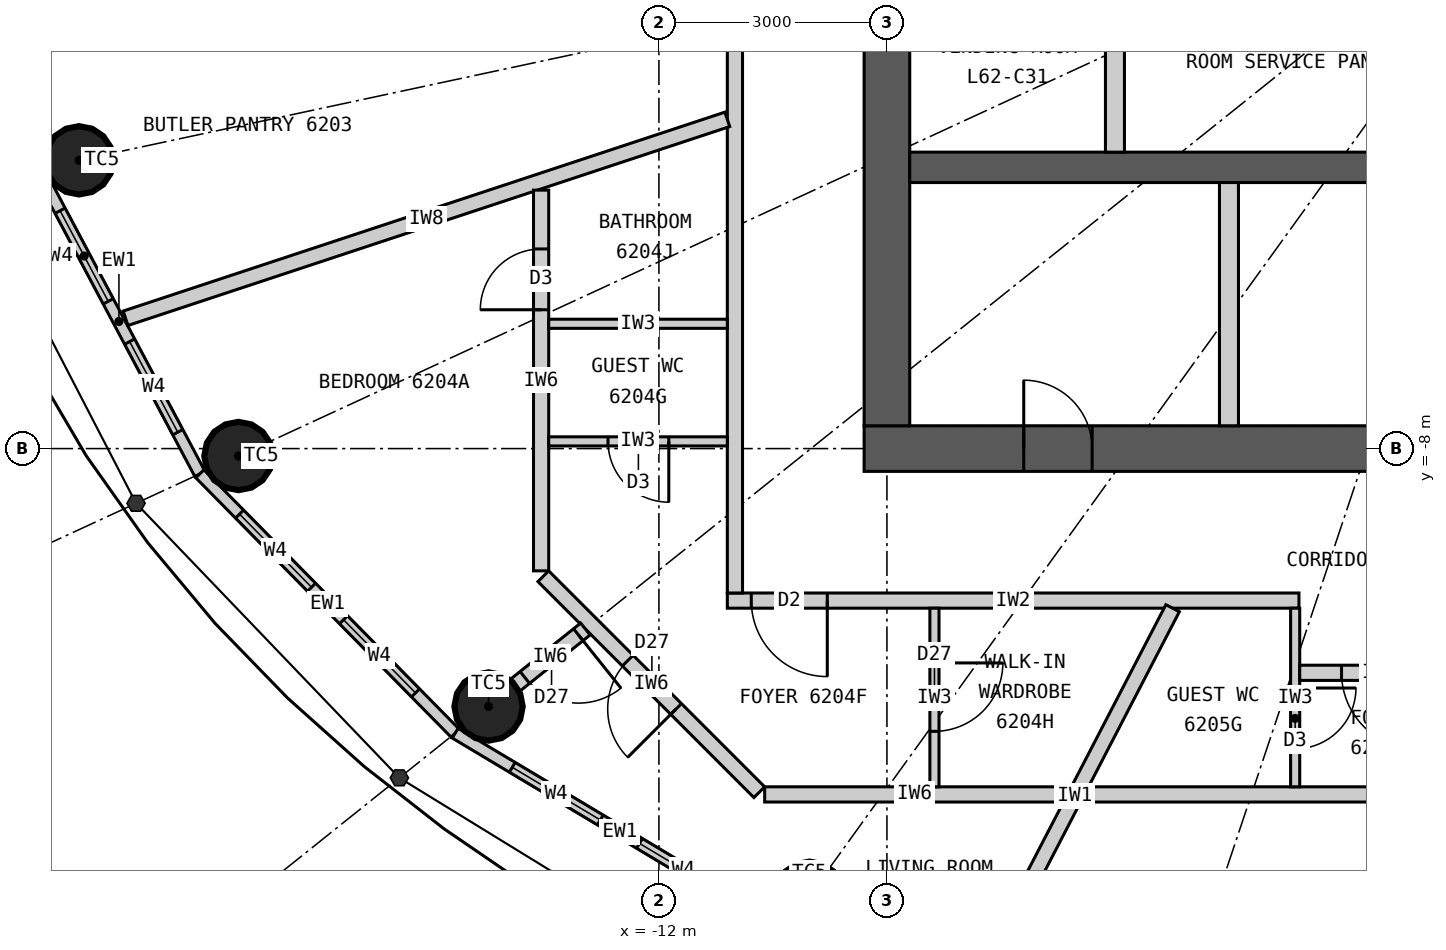
"""IFC4 building model, lengths in metres.
Left out: names, types, materials, properties, quantities, classifications, styles, units other than length and angle.
Written with IfcOpenShell. Run it as: python <this file> out.ifc"""

import sys

from ifc_helpers import new_model, si_unit, direction, frame, frame_2d, origin, origin_2d, place, context, subcontext, project, spatial, rectangle, circle, extrude, clip, halfspace, element, fill, save


model = new_model("IFC4")
c1 = context("Model", 3, precision=1e-05, world=origin(), true_north=direction((0.0, 1.0)))
c2 = subcontext(c1, "Body", "Model", "MODEL_VIEW")
j1 = project(units=[si_unit("LENGTHUNIT", "METRE"), si_unit("PLANEANGLEUNIT", "RADIAN")], contexts=[c1])
p1 = place(None, origin())
s1 = spatial("IfcSite", under=j1, at=p1, CompositionType="ELEMENT")
p2 = place(p1, origin())
s2 = spatial("IfcBuilding", under=s1, at=p2, CompositionType="ELEMENT")
p3 = place(p2, frame((0.0, 0.0, 229.2)))
s3 = spatial("IfcBuildingStorey", under=s2, at=p3, CompositionType="ELEMENT", Elevation=229.2)
for number, where, z_axis, x_axis in (
    (1, (-19.629, -4.208, 0.0), (0.0, 0.0, 1.0), (1.0, 0.0, 0.0)),
    (2, (-17.532, -8.098, 0.0), (0.0, 0.0, 1.0), (1.0, 0.0, 0.0)),
    (3, (-14.241, -11.393, 0.0), (0.0, 0.0, 1.0), (1.0, 0.0, 0.0)),
    (4, (-10.019, -13.883, 0.0), (0.0, 0.0, 1.0), (1.0, 0.0, 0.0)),
):
    element("IfcColumn", number, at=place(p3, frame(where, z_axis=z_axis, x_axis=x_axis)), inside=s3, PredefinedType="COLUMN", context=c2, shape_type="Clipping", body=[
        clip(extrude(circle(Radius=0.45, at=origin_2d()), origin(), (0.0, 0.0, 1.0), 3.3), halfspace(frame((0.0, 0.0, 2.25), z_axis=(0.0, 0.0, 1.0), x_axis=(1.0, 0.0, 0.0)), False)),
    ])
p4 = place(p3, frame((9.3, -8.0, 0.0), z_axis=(0.0, 0.0, 1.0), x_axis=(-1.0, 0.0, 0.0)))
e5 = element("IfcWall", 5, at=p4, inside=s3, PredefinedType="SHEAR", context=c2, shape_type="SweptSolid", body=[
    extrude(rectangle(XDim=18.6, YDim=0.6, at=frame_2d((9.3, 0.0))), origin(), (0.0, 0.0, 1.0), 3.3),
])
p5 = place(p4, frame((8.0, 0.0, 0.0)))
e6 = element("IfcOpeningElement", 6, at=p5, cuts=e5, PredefinedType="OPENING", context=c2, shape_type="SweptSolid", body=[
    extrude(rectangle(XDim=1.2, YDim=2.2, at=frame_2d((0.6, 1.1))), frame((0.0, 0.31, 0.0), z_axis=(0.0, -1.0, 0.0), x_axis=(1.0, 0.0, 0.0)), (0.0, 0.0, 1.0), 0.62),
])
p6 = place(p4, frame((15.6, 0.0, 0.0)))
e7 = element("IfcOpeningElement", 7, at=p6, cuts=e5, PredefinedType="OPENING", context=c2, shape_type="SweptSolid", body=[
    extrude(rectangle(XDim=0.9, YDim=2.2, at=frame_2d((0.45, 1.1))), frame((0.0, 0.31, 0.0), z_axis=(0.0, -1.0, 0.0), x_axis=(1.0, 0.0, 0.0)), (0.0, 0.0, 1.0), 0.62),
])
p7 = place(p3, frame((-9.0, 7.7, 0.0), z_axis=(0.0, 0.0, 1.0), x_axis=(0.0, -1.0, 0.0)))
e8 = element("IfcWall", 8, at=p7, inside=s3, PredefinedType="SHEAR", context=c2, shape_type="SweptSolid", body=[
    extrude(rectangle(XDim=15.4, YDim=0.6, at=frame_2d((7.7, 0.0))), origin(), (0.0, 0.0, 1.0), 3.3),
])
p8 = place(p7, frame((6.8, 0.0, 0.0)))
e9 = element("IfcOpeningElement", 9, at=p8, cuts=e8, PredefinedType="OPENING", context=c2, shape_type="SweptSolid", body=[
    extrude(rectangle(XDim=1.8, YDim=2.2, at=frame_2d((0.9, 1.1))), frame((0.0, 0.31, 0.0), z_axis=(0.0, -1.0, 0.0), x_axis=(1.0, 0.0, 0.0)), (0.0, 0.0, 1.0), 0.62),
])
p9 = place(p3, frame((-8.7, -4.3, 0.0), z_axis=(0.0, 0.0, 1.0), x_axis=(1.0, 0.0, 0.0)))
e10 = element("IfcWall", 10, at=p9, inside=s3, PredefinedType="SHEAR", context=c2, shape_type="SweptSolid", body=[
    extrude(rectangle(XDim=17.4, YDim=0.4, at=frame_2d((8.7, 0.0))), origin(), (0.0, 0.0, 1.0), 3.3),
])
p10 = place(p3, frame((-4.5, -7.7, 0.0), z_axis=(0.0, 0.0, 1.0), x_axis=(0.0, 1.0, 0.0)))
e11 = element("IfcWall", 11, at=p10, inside=s3, PredefinedType="PARTITIONING", context=c2, shape_type="SweptSolid", body=[
    extrude(rectangle(XDim=3.2, YDim=0.25, at=frame_2d((1.6, 0.0))), origin(), (0.0, 0.0, 1.0), 3.3),
])
p11 = place(p3, frame((-6.0, -4.1, 0.0), z_axis=(0.0, 0.0, 1.0), x_axis=(0.0, 1.0, 0.0)))
e12 = element("IfcWall", 12, at=p11, inside=s3, PredefinedType="PARTITIONING", context=c2, shape_type="SweptSolid", body=[
    extrude(rectangle(XDim=2.35, YDim=0.25, at=frame_2d((1.175, 0.0))), origin(), (0.0, 0.0, 1.0), 3.3),
])
p12 = place(p3, frame((-20.17, -4.323, 0.0), z_axis=(0.0, 0.0, 1.0), x_axis=(0.469256152955, -0.883062094597, 0.0)))
e13 = element("IfcWall", 13, at=p12, inside=s3, PredefinedType="ELEMENTEDWALL", context=c2, shape_type="SweptSolid", body=[
    extrude(rectangle(XDim=4.539, YDim=0.15, at=frame_2d((2.27, 0.0))), origin(), (0.0, 0.0, 1.0), 3.05),
])
p13 = place(p12, frame((0.62, 0.0, 0.9)))
e14 = element("IfcOpeningElement", 14, at=p13, cuts=e13, PredefinedType="OPENING", context=c2, shape_type="SweptSolid", body=[
    extrude(rectangle(XDim=1.35, YDim=1.9, at=frame_2d((0.675, 0.95))), frame((0.0, 0.085, 0.0), z_axis=(0.0, -1.0, 0.0), x_axis=(1.0, 0.0, 0.0)), (0.0, 0.0, 1.0), 0.17),
])
p14 = place(p12, frame((2.57, 0.0, 0.9)))
e15 = element("IfcOpeningElement", 15, at=p14, cuts=e13, PredefinedType="OPENING", context=c2, shape_type="SweptSolid", body=[
    extrude(rectangle(XDim=1.35, YDim=1.9, at=frame_2d((0.675, 0.95))), frame((0.0, 0.085, 0.0), z_axis=(0.0, -1.0, 0.0), x_axis=(1.0, 0.0, 0.0)), (0.0, 0.0, 1.0), 0.17),
])
p15 = place(p3, frame((-18.04, -8.332, 0.0), z_axis=(0.0, 0.0, 1.0), x_axis=(0.701527379618, -0.712642501993, 0.0)))
e16 = element("IfcWall", 16, at=p15, inside=s3, PredefinedType="ELEMENTEDWALL", context=c2, shape_type="SweptSolid", body=[
    extrude(rectangle(XDim=4.788, YDim=0.15, at=frame_2d((2.394, 0.0))), origin(), (0.0, 0.0, 1.0), 3.05),
])
p16 = place(p15, frame((0.744, 0.0, 0.9)))
e17 = element("IfcOpeningElement", 17, at=p16, cuts=e16, PredefinedType="OPENING", context=c2, shape_type="SweptSolid", body=[
    extrude(rectangle(XDim=1.35, YDim=1.9, at=frame_2d((0.675, 0.95))), frame((0.0, 0.085, 0.0), z_axis=(0.0, -1.0, 0.0), x_axis=(1.0, 0.0, 0.0)), (0.0, 0.0, 1.0), 0.17),
])
p17 = place(p15, frame((2.694, 0.0, 0.9)))
e18 = element("IfcOpeningElement", 18, at=p17, cuts=e16, PredefinedType="OPENING", context=c2, shape_type="SweptSolid", body=[
    extrude(rectangle(XDim=1.35, YDim=1.9, at=frame_2d((0.675, 0.95))), frame((0.0, 0.085, 0.0), z_axis=(0.0, -1.0, 0.0), x_axis=(1.0, 0.0, 0.0)), (0.0, 0.0, 1.0), 0.17),
])
p18 = place(p3, frame((-14.68, -11.744, 0.0), z_axis=(0.0, 0.0, 1.0), x_axis=(0.85822150553, -0.513279502265, 0.0)))
e19 = element("IfcWall", 19, at=p18, inside=s3, PredefinedType="ELEMENTEDWALL", context=c2, shape_type="SweptSolid", body=[
    extrude(rectangle(XDim=5.05, YDim=0.15, at=frame_2d((2.525, 0.0))), origin(), (0.0, 0.0, 1.0), 3.05),
])
p19 = place(p18, frame((0.875, 0.0, 0.9)))
e20 = element("IfcOpeningElement", 20, at=p19, cuts=e19, PredefinedType="OPENING", context=c2, shape_type="SweptSolid", body=[
    extrude(rectangle(XDim=1.35, YDim=1.9, at=frame_2d((0.675, 0.95))), frame((0.0, 0.085, 0.0), z_axis=(0.0, -1.0, 0.0), x_axis=(1.0, 0.0, 0.0)), (0.0, 0.0, 1.0), 0.17),
])
p20 = place(p18, frame((2.825, 0.0, 0.9)))
e21 = element("IfcOpeningElement", 21, at=p20, cuts=e19, PredefinedType="OPENING", context=c2, shape_type="SweptSolid", body=[
    extrude(rectangle(XDim=1.35, YDim=1.9, at=frame_2d((0.675, 0.95))), frame((0.0, 0.085, 0.0), z_axis=(0.0, -1.0, 0.0), x_axis=(1.0, 0.0, 0.0)), (0.0, 0.0, 1.0), 0.17),
])
p21 = place(p3, frame((-3.579, -10.0, 0.0), z_axis=(0.0, 0.0, 1.0), x_axis=(-1.0, 0.0, 0.0)))
e22 = element("IfcWall", 22, at=p21, inside=s3, PredefinedType="PARTITIONING", context=c2, shape_type="SweptSolid", body=[
    extrude(rectangle(XDim=7.521, YDim=0.2, at=frame_2d((3.761, 0.0))), origin(), (0.0, 0.0, 1.0), 3.05),
])
p22 = place(p21, frame((6.206, 0.0, 0.0)))
e23 = element("IfcOpeningElement", 23, at=p22, cuts=e22, PredefinedType="OPENING", context=c2, shape_type="SweptSolid", body=[
    extrude(rectangle(XDim=1.0, YDim=2.2, at=frame_2d((0.5, 1.1))), frame((0.0, 0.11, 0.0), z_axis=(0.0, -1.0, 0.0), x_axis=(1.0, 0.0, 0.0)), (0.0, 0.0, 1.0), 0.22),
])
p23 = place(p3, frame((-11.0, 9.9, 0.0), z_axis=(0.0, 0.0, 1.0), x_axis=(0.0, -1.0, 0.0)))
e24 = element("IfcWall", 24, at=p23, inside=s3, PredefinedType="PARTITIONING", context=c2, shape_type="SweptSolid", body=[
    extrude(rectangle(XDim=19.8, YDim=0.2, at=frame_2d((9.9, 0.0))), origin(), (0.0, 0.0, 1.0), 3.05),
])
p24 = place(p23, frame((11.444, 0.0, 0.0)))
e25 = element("IfcOpeningElement", 25, at=p24, cuts=e24, PredefinedType="OPENING", context=c2, shape_type="SweptSolid", body=[
    extrude(rectangle(XDim=1.0, YDim=2.2, at=frame_2d((0.5, 1.1))), frame((0.0, 0.11, 0.0), z_axis=(0.0, -1.0, 0.0), x_axis=(1.0, 0.0, 0.0)), (0.0, 0.0, 1.0), 0.22),
])
p25 = place(p3, frame((-11.1, -3.669, 0.0), z_axis=(0.0, 0.0, 1.0), x_axis=(-0.949476668397, -0.313837627079, 0.0)))
e26 = element("IfcWall", 26, at=p25, inside=s3, PredefinedType="PARTITIONING", context=c2, shape_type="SweptSolid", body=[
    extrude(rectangle(XDim=8.339, YDim=0.2, at=frame_2d((4.169, 0.0))), origin(), (0.0, 0.0, 1.0), 3.05),
])
p26 = place(p3, frame((-5.241, -10.1, 0.0), z_axis=(0.0, 0.0, 1.0), x_axis=(-0.460603196597, -0.887606160008, 0.0)))
e27 = element("IfcWall", 27, at=p26, inside=s3, PredefinedType="PARTITIONING", context=c2, shape_type="SweptSolid", body=[
    extrude(rectangle(XDim=5.58, YDim=0.2, at=frame_2d((2.79, 0.0))), origin(), (0.0, 0.0, 1.0), 3.05),
])
p27 = place(p3, frame((-13.55, -4.6, 0.0), z_axis=(0.0, 0.0, 1.0), x_axis=(0.0, -1.0, 0.0)))
e28 = element("IfcWall", 28, at=p27, inside=s3, PredefinedType="PARTITIONING", context=c2, shape_type="SweptSolid", body=[
    extrude(rectangle(XDim=5.009, YDim=0.2, at=frame_2d((2.504, 0.0))), origin(), (0.0, 0.0, 1.0), 3.05),
])
p28 = place(p27, frame((0.774, 0.0, 0.0)))
e29 = element("IfcOpeningElement", 29, at=p28, cuts=e28, PredefinedType="OPENING", context=c2, shape_type="SweptSolid", body=[
    extrude(rectangle(XDim=0.8, YDim=2.1, at=frame_2d((0.4, 1.05))), frame((0.0, 0.11, 0.0), z_axis=(0.0, -1.0, 0.0), x_axis=(1.0, 0.0, 0.0)), (0.0, 0.0, 1.0), 0.22),
])
p29 = place(p3, frame((-13.521, -9.679, 0.0), z_axis=(0.0, 0.0, 1.0), x_axis=(0.707106781187, -0.707106781187, 0.0)))
e30 = element("IfcWall", 30, at=p29, inside=s3, PredefinedType="PARTITIONING", context=c2, shape_type="SweptSolid", body=[
    extrude(rectangle(XDim=4.019, YDim=0.2, at=frame_2d((2.009, 0.0))), origin(), (0.0, 0.0, 1.0), 3.05),
])
p30 = place(p29, frame((1.57, 0.0, 0.0)))
e31 = element("IfcOpeningElement", 31, at=p30, cuts=e30, PredefinedType="OPENING", context=c2, shape_type="SweptSolid", body=[
    extrude(rectangle(XDim=0.9, YDim=2.1, at=frame_2d((0.45, 1.05))), frame((0.0, 0.11, 0.0), z_axis=(0.0, -1.0, 0.0), x_axis=(1.0, 0.0, 0.0)), (0.0, 0.0, 1.0), 0.22),
])
p31 = place(p3, frame((-10.609, -12.55, 0.0), z_axis=(0.0, 0.0, 1.0), x_axis=(1.0, 0.0, 0.0)))
e32 = element("IfcWall", 32, at=p31, inside=s3, PredefinedType="PARTITIONING", context=c2, shape_type="SweptSolid", body=[
    extrude(rectangle(XDim=3.947, YDim=0.2, at=frame_2d((1.974, 0.0))), origin(), (0.0, 0.0, 1.0), 3.05),
])
p32 = place(p3, frame((-12.968, -10.374, 0.0), z_axis=(0.0, 0.0, 1.0), x_axis=(-0.780888968944, -0.624669847345, 0.0)))
e33 = element("IfcWall", 33, at=p32, inside=s3, PredefinedType="PARTITIONING", context=c2, shape_type="SweptSolid", body=[
    extrude(rectangle(XDim=1.181, YDim=0.2, at=frame_2d((0.591, 0.0))), origin(), (0.0, 0.0, 1.0), 2.15),
])
p33 = place(p32, frame((0.12, 0.0, 0.0)))
e34 = element("IfcOpeningElement", 34, at=p33, cuts=e33, PredefinedType="OPENING", context=c2, shape_type="SweptSolid", body=[
    extrude(rectangle(XDim=0.9, YDim=2.1, at=frame_2d((0.45, 1.05))), frame((0.0, 0.11, 0.0), z_axis=(0.0, -1.0, 0.0), x_axis=(1.0, 0.0, 0.0)), (0.0, 0.0, 1.0), 0.22),
])
p34 = place(p3, frame((-11.1, -6.358, 0.0), z_axis=(0.0, 0.0, 1.0), x_axis=(-1.0, 0.0, 0.0)))
e35 = element("IfcWall", 35, at=p34, inside=s3, PredefinedType="PARTITIONING", context=c2, shape_type="SweptSolid", body=[
    extrude(rectangle(XDim=2.35, YDim=0.12, at=frame_2d((1.175, 0.0))), origin(), (0.0, 0.0, 1.0), 3.05),
])
p35 = place(p3, frame((-11.1, -7.905, 0.0), z_axis=(0.0, 0.0, 1.0), x_axis=(-1.0, 0.0, 0.0)))
e36 = element("IfcWall", 36, at=p35, inside=s3, PredefinedType="PARTITIONING", context=c2, shape_type="SweptSolid", body=[
    extrude(rectangle(XDim=2.35, YDim=0.12, at=frame_2d((1.175, 0.0))), origin(), (0.0, 0.0, 1.0), 3.05),
])
p36 = place(p35, frame((0.77, 0.0, 0.0)))
e37 = element("IfcOpeningElement", 37, at=p36, cuts=e36, PredefinedType="OPENING", context=c2, shape_type="SweptSolid", body=[
    extrude(rectangle(XDim=0.8, YDim=2.1, at=frame_2d((0.4, 1.05))), frame((0.0, 0.07, 0.0), z_axis=(0.0, -1.0, 0.0), x_axis=(1.0, 0.0, 0.0)), (0.0, 0.0, 1.0), 0.14),
])
p37 = place(p3, frame((-8.375, -10.1, 0.0), z_axis=(0.0, 0.0, 1.0), x_axis=(0.0, -1.0, 0.0)))
e38 = element("IfcWall", 38, at=p37, inside=s3, PredefinedType="PARTITIONING", context=c2, shape_type="SweptSolid", body=[
    extrude(rectangle(XDim=2.35, YDim=0.12, at=frame_2d((1.175, 0.0))), origin(), (0.0, 0.0, 1.0), 3.05),
])
p38 = place(p37, frame((0.72, 0.0, 0.0)))
e39 = element("IfcOpeningElement", 39, at=p38, cuts=e38, PredefinedType="OPENING", context=c2, shape_type="SweptSolid", body=[
    extrude(rectangle(XDim=0.9, YDim=2.1, at=frame_2d((0.45, 1.05))), frame((0.0, 0.07, 0.0), z_axis=(0.0, -1.0, 0.0), x_axis=(1.0, 0.0, 0.0)), (0.0, 0.0, 1.0), 0.14),
])
p39 = place(p3, frame((-6.364, -12.55, 0.0), z_axis=(0.0, 0.0, 1.0), x_axis=(1.0, 0.0, 0.0)))
e40 = element("IfcWall", 40, at=p39, inside=s3, PredefinedType="PARTITIONING", context=c2, shape_type="SweptSolid", body=[
    extrude(rectangle(XDim=10.446, YDim=0.2, at=frame_2d((5.223, 0.0))), origin(), (0.0, 0.0, 1.0), 3.05),
])
p40 = place(p39, frame((7.202, 0.0, 0.0)))
e41 = element("IfcOpeningElement", 41, at=p40, cuts=e40, PredefinedType="OPENING", context=c2, shape_type="SweptSolid", body=[
    extrude(rectangle(XDim=0.8, YDim=2.1, at=frame_2d((0.4, 1.05))), frame((0.0, 0.11, 0.0), z_axis=(0.0, -1.0, 0.0), x_axis=(1.0, 0.0, 0.0)), (0.0, 0.0, 1.0), 0.22),
])
p41 = place(p39, frame((3.895, 0.0, 0.0)))
e42 = element("IfcOpeningElement", 42, at=p41, cuts=e40, PredefinedType="OPENING", context=c2, shape_type="SweptSolid", body=[
    extrude(rectangle(XDim=0.9, YDim=2.1, at=frame_2d((0.45, 1.05))), frame((0.0, 0.11, 0.0), z_axis=(0.0, -1.0, 0.0), x_axis=(1.0, 0.0, 0.0)), (0.0, 0.0, 1.0), 0.22),
])
p42 = place(p3, frame((-3.629, -10.1, 0.0), z_axis=(0.0, 0.0, 1.0), x_axis=(0.0, -1.0, 0.0)))
e43 = element("IfcWall", 43, at=p42, inside=s3, PredefinedType="PARTITIONING", context=c2, shape_type="SweptSolid", body=[
    extrude(rectangle(XDim=2.35, YDim=0.12, at=frame_2d((1.175, 0.0))), origin(), (0.0, 0.0, 1.0), 3.05),
])
p43 = place(p42, frame((1.05, 0.0, 0.0)))
e44 = element("IfcOpeningElement", 44, at=p43, cuts=e43, PredefinedType="OPENING", context=c2, shape_type="SweptSolid", body=[
    extrude(rectangle(XDim=0.8, YDim=2.1, at=frame_2d((0.4, 1.05))), frame((0.0, 0.07, 0.0), z_axis=(0.0, -1.0, 0.0), x_axis=(1.0, 0.0, 0.0)), (0.0, 0.0, 1.0), 0.14),
])
p44 = place(p3, frame((-3.569, -10.95, 0.0), z_axis=(0.0, 0.0, 1.0), x_axis=(1.0, 0.0, 0.0)))
e45 = element("IfcWall", 45, at=p44, inside=s3, PredefinedType="PARTITIONING", context=c2, shape_type="SweptSolid", body=[
    extrude(rectangle(XDim=2.1, YDim=0.2, at=frame_2d((1.05, 0.0))), origin(), (0.0, 0.0, 1.0), 3.05),
])
p45 = place(p44, frame((0.55, 0.0, 0.0)))
e46 = element("IfcOpeningElement", 46, at=p45, cuts=e45, PredefinedType="OPENING", context=c2, shape_type="SweptSolid", body=[
    extrude(rectangle(XDim=1.0, YDim=2.2, at=frame_2d((0.5, 1.1))), frame((0.0, 0.11, 0.0), z_axis=(0.0, -1.0, 0.0), x_axis=(1.0, 0.0, 0.0)), (0.0, 0.0, 1.0), 0.22),
])
p46 = place(p13, origin())
e47 = element("IfcWindow", 47, at=p46, inside=s3, PartitioningType="SINGLE_PANEL", PredefinedType="WINDOW", context=c2, shape_type="SweptSolid", body=[
    extrude(rectangle(XDim=1.35, YDim=1.9, at=frame_2d((0.675, 0.95))), frame((0.0, 0.03, 0.0), z_axis=(0.0, -1.0, 0.0), x_axis=(1.0, 0.0, 0.0)), (0.0, 0.0, 1.0), 0.06),
])
fill(e14, e47)
p47 = place(p14, origin())
e48 = element("IfcWindow", 48, at=p47, inside=s3, PartitioningType="SINGLE_PANEL", PredefinedType="WINDOW", context=c2, shape_type="SweptSolid", body=[
    extrude(rectangle(XDim=1.35, YDim=1.9, at=frame_2d((0.675, 0.95))), frame((0.0, 0.03, 0.0), z_axis=(0.0, -1.0, 0.0), x_axis=(1.0, 0.0, 0.0)), (0.0, 0.0, 1.0), 0.06),
])
fill(e15, e48)
p48 = place(p16, origin())
e49 = element("IfcWindow", 49, at=p48, inside=s3, PartitioningType="SINGLE_PANEL", PredefinedType="WINDOW", context=c2, shape_type="SweptSolid", body=[
    extrude(rectangle(XDim=1.35, YDim=1.9, at=frame_2d((0.675, 0.95))), frame((0.0, 0.03, 0.0), z_axis=(0.0, -1.0, 0.0), x_axis=(1.0, 0.0, 0.0)), (0.0, 0.0, 1.0), 0.06),
])
fill(e17, e49)
p49 = place(p17, origin())
e50 = element("IfcWindow", 50, at=p49, inside=s3, PartitioningType="SINGLE_PANEL", PredefinedType="WINDOW", context=c2, shape_type="SweptSolid", body=[
    extrude(rectangle(XDim=1.35, YDim=1.9, at=frame_2d((0.675, 0.95))), frame((0.0, 0.03, 0.0), z_axis=(0.0, -1.0, 0.0), x_axis=(1.0, 0.0, 0.0)), (0.0, 0.0, 1.0), 0.06),
])
fill(e18, e50)
p50 = place(p19, origin())
e51 = element("IfcWindow", 51, at=p50, inside=s3, PartitioningType="SINGLE_PANEL", PredefinedType="WINDOW", context=c2, shape_type="SweptSolid", body=[
    extrude(rectangle(XDim=1.35, YDim=1.9, at=frame_2d((0.675, 0.95))), frame((0.0, 0.03, 0.0), z_axis=(0.0, -1.0, 0.0), x_axis=(1.0, 0.0, 0.0)), (0.0, 0.0, 1.0), 0.06),
])
fill(e20, e51)
p51 = place(p20, origin())
e52 = element("IfcWindow", 52, at=p51, inside=s3, PartitioningType="SINGLE_PANEL", PredefinedType="WINDOW", context=c2, shape_type="SweptSolid", body=[
    extrude(rectangle(XDim=1.35, YDim=1.9, at=frame_2d((0.675, 0.95))), frame((0.0, 0.03, 0.0), z_axis=(0.0, -1.0, 0.0), x_axis=(1.0, 0.0, 0.0)), (0.0, 0.0, 1.0), 0.06),
])
fill(e21, e52)
p52 = place(p22, origin())
e53 = element("IfcDoor", 53, at=p52, inside=s3, OperationType="SINGLE_SWING_LEFT", PredefinedType="DOOR", context=c2, shape_type="SweptSolid", body=[
    extrude(rectangle(XDim=1.0, YDim=2.2, at=frame_2d((0.5, 1.1))), frame((0.0, 0.025, 0.0), z_axis=(0.0, -1.0, 0.0), x_axis=(1.0, 0.0, 0.0)), (0.0, 0.0, 1.0), 0.05),
])
fill(e23, e53)
p53 = place(p28, origin())
e54 = element("IfcDoor", 54, at=p53, inside=s3, OperationType="SINGLE_SWING_RIGHT", PredefinedType="DOOR", context=c2, shape_type="SweptSolid", body=[
    extrude(rectangle(XDim=0.8, YDim=2.1, at=frame_2d((0.4, 1.05))), frame((0.0, 0.025, 0.0), z_axis=(0.0, -1.0, 0.0), x_axis=(1.0, 0.0, 0.0)), (0.0, 0.0, 1.0), 0.05),
])
fill(e29, e54)
p54 = place(p36, origin())
e55 = element("IfcDoor", 55, at=p54, inside=s3, OperationType="SINGLE_SWING_LEFT", PredefinedType="DOOR", context=c2, shape_type="SweptSolid", body=[
    extrude(rectangle(XDim=0.8, YDim=2.1, at=frame_2d((0.4, 1.05))), frame((0.0, 0.025, 0.0), z_axis=(0.0, -1.0, 0.0), x_axis=(1.0, 0.0, 0.0)), (0.0, 0.0, 1.0), 0.05),
])
fill(e37, e55)
p55 = place(p38, origin())
e56 = element("IfcDoor", 56, at=p55, inside=s3, OperationType="SINGLE_SWING_LEFT", PredefinedType="DOOR", context=c2, shape_type="SweptSolid", body=[
    extrude(rectangle(XDim=0.9, YDim=2.1, at=frame_2d((0.45, 1.05))), frame((0.0, 0.025, 0.0), z_axis=(0.0, -1.0, 0.0), x_axis=(1.0, 0.0, 0.0)), (0.0, 0.0, 1.0), 0.05),
])
fill(e39, e56)
p56 = place(p30, origin())
e57 = element("IfcDoor", 57, at=p56, inside=s3, OperationType="SINGLE_SWING_RIGHT", PredefinedType="DOOR", context=c2, shape_type="SweptSolid", body=[
    extrude(rectangle(XDim=0.9, YDim=2.1, at=frame_2d((0.45, 1.05))), frame((0.0, 0.025, 0.0), z_axis=(0.0, -1.0, 0.0), x_axis=(1.0, 0.0, 0.0)), (0.0, 0.0, 1.0), 0.05),
])
fill(e31, e57)
p57 = place(p33, origin())
e58 = element("IfcDoor", 58, at=p57, inside=s3, OperationType="SINGLE_SWING_LEFT", PredefinedType="DOOR", context=c2, shape_type="SweptSolid", body=[
    extrude(rectangle(XDim=0.9, YDim=2.1, at=frame_2d((0.45, 1.05))), frame((0.0, 0.025, 0.0), z_axis=(0.0, -1.0, 0.0), x_axis=(1.0, 0.0, 0.0)), (0.0, 0.0, 1.0), 0.05),
])
fill(e34, e58)
p58 = place(p45, origin())
e59 = element("IfcDoor", 59, at=p58, inside=s3, OperationType="SINGLE_SWING_RIGHT", PredefinedType="DOOR", context=c2, shape_type="SweptSolid", body=[
    extrude(rectangle(XDim=1.0, YDim=2.2, at=frame_2d((0.5, 1.1))), frame((0.0, 0.025, 0.0), z_axis=(0.0, -1.0, 0.0), x_axis=(1.0, 0.0, 0.0)), (0.0, 0.0, 1.0), 0.05),
])
fill(e46, e59)
p59 = place(p43, origin())
e60 = element("IfcDoor", 60, at=p59, inside=s3, OperationType="SINGLE_SWING_LEFT", PredefinedType="DOOR", context=c2, shape_type="SweptSolid", body=[
    extrude(rectangle(XDim=0.8, YDim=2.1, at=frame_2d((0.4, 1.05))), frame((0.0, 0.025, 0.0), z_axis=(0.0, -1.0, 0.0), x_axis=(1.0, 0.0, 0.0)), (0.0, 0.0, 1.0), 0.05),
])
fill(e44, e60)
p60 = place(p6, origin())
e61 = element("IfcDoor", 61, at=p60, inside=s3, OperationType="SINGLE_SWING_RIGHT", PredefinedType="DOOR", context=c2, shape_type="SweptSolid", body=[
    extrude(rectangle(XDim=0.9, YDim=2.2, at=frame_2d((0.45, 1.1))), frame((0.0, 0.025, 0.0), z_axis=(0.0, -1.0, 0.0), x_axis=(1.0, 0.0, 0.0)), (0.0, 0.0, 1.0), 0.05),
])
fill(e7, e61)
save(model, sys.argv[1])
